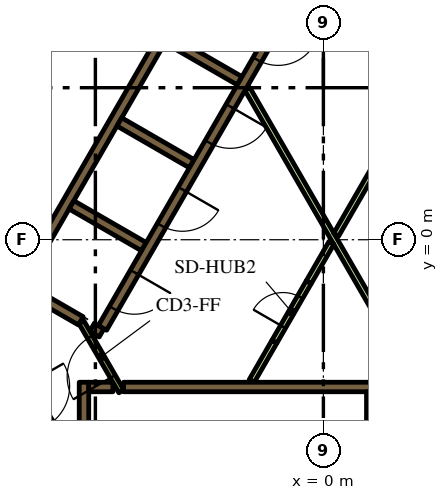
"""IFC4 building model, lengths in metres.
Left out: names, types, materials, properties, quantities, classifications, styles, units other than length and angle.
Written with IfcOpenShell. Run it as: python <this file> out.ifc"""

import sys

from ifc_helpers import new_model, si_unit, direction, frame, frame_2d, origin, place, context, subcontext, project, spatial, rectangle, extrude, element, fill, save


model = new_model("IFC4")
c1 = context("Model", 3, precision=1e-05, world=origin(), true_north=direction((0.0, 1.0)))
c2 = subcontext(c1, "Body", "Model", "MODEL_VIEW")
j1 = project(units=[si_unit("LENGTHUNIT", "METRE"), si_unit("PLANEANGLEUNIT", "RADIAN")], contexts=[c1])
p1 = place(None, origin())
s1 = spatial("IfcSite", under=j1, at=p1, CompositionType="ELEMENT")
p2 = place(p1, origin())
s2 = spatial("IfcBuilding", under=s1, at=p2, CompositionType="ELEMENT")
p3 = place(p2, frame((0.0, 0.0, 122.7)))
s3 = spatial("IfcBuildingStorey", under=s2, at=p3, CompositionType="ELEMENT", Elevation=122.7)
p4 = place(p3, frame((-15.36, -1.503, 0.0), z_axis=(0.0, 0.0, 1.0), x_axis=(0.50000389221, 0.866023156604, 0.0)))
e1 = element("IfcWall", 1, at=p4, inside=s3, PredefinedType="SOLIDWALL", context=c2, shape_type="SweptSolid", body=[
    extrude(rectangle(XDim=21.0, YDim=0.9, at=frame_2d((10.5, 0.0))), origin(), (0.0, 0.0, 1.0), 3.9),
])
p5 = place(p3, frame((-5.259, -3.875, 0.0), z_axis=(0.0, 0.0, 1.0), x_axis=(1.0, 0.0, 0.0)))
e2 = element("IfcWall", 2, at=p5, inside=s3, PredefinedType="SOLIDWALL", context=c2, shape_type="SweptSolid", body=[
    extrude(rectangle(XDim=10.489, YDim=0.25, at=frame_2d((5.244, 0.0))), origin(), (0.0, 0.0, 1.0), 3.9),
])
p6 = place(p3, frame((1.26, -4.0, 0.0), z_axis=(0.0, 0.0, 1.0), x_axis=(0.0, -1.0, 0.0)))
e3 = element("IfcWall", 3, at=p6, inside=s3, PredefinedType="SOLIDWALL", context=c2, shape_type="SweptSolid", body=[
    extrude(rectangle(XDim=2.2, YDim=0.25, at=frame_2d((1.1, 0.0))), origin(), (0.0, 0.0, 1.0), 3.9),
])
p7 = place(p3, frame((-6.3, -3.75, 0.0), z_axis=(0.0, 0.0, 1.0), x_axis=(0.0, -1.0, 0.0)))
e4 = element("IfcWall", 4, at=p7, inside=s3, PredefinedType="SOLIDWALL", context=c2, shape_type="SweptSolid", body=[
    extrude(rectangle(XDim=3.404, YDim=0.25, at=frame_2d((1.702, 0.0))), origin(), (0.0, 0.0, 1.0), 3.9),
])
p8 = place(p3, frame((-6.175, -3.875, 0.0), z_axis=(0.0, 0.0, 1.0), x_axis=(1.0, 0.0, 0.0)))
e5 = element("IfcWall", 5, at=p8, inside=s3, PredefinedType="SOLIDWALL", context=c2, shape_type="SweptSolid", body=[
    extrude(rectangle(XDim=0.637, YDim=0.25, at=frame_2d((0.318, 0.0))), origin(), (0.0, 0.0, 1.0), 3.9),
])
p9 = place(p3, frame((5.97, -2.591, 0.0), z_axis=(0.0, 0.0, 1.0), x_axis=(-0.499994469932, 0.866028596547, 0.0)))
e6 = element("IfcWall", 6, at=p9, inside=s3, PredefinedType="SOLIDWALL", context=c2, shape_type="SweptSolid", body=[
    extrude(rectangle(XDim=10.488, YDim=0.25, at=frame_2d((5.244, 0.0))), origin(), (0.0, 0.0, 1.0), 3.9),
])
p10 = place(p3, frame((-8.06, -1.311, 0.0), z_axis=(0.0, 0.0, 1.0), x_axis=(0.50000273126, 0.866023826885, 0.0)))
e7 = element("IfcWall", 7, at=p10, inside=s3, PredefinedType="SOLIDWALL", context=c2, shape_type="SweptSolid", body=[
    extrude(rectangle(XDim=10.33, YDim=0.25, at=frame_2d((5.165, 0.0))), origin(), (0.0, 0.0, 1.0), 3.9),
])
for number, where, z_axis, x_axis in (
    (8, (-2.204, 4.182, 0.0), (0.0, 0.0, 1.0), (-0.866, 0.5, 0.0)),
    (9, (-5.369, 3.1, 0.0), (0.0, 0.0, 1.0), (0.866, -0.5, 0.0)),
    (10, (-4.724, -0.182, 0.0), (0.0, 0.0, 1.0), (-0.866, 0.5, 0.0)),
):
    element("IfcWall", number, at=place(p3, frame(where, z_axis=z_axis, x_axis=x_axis)), inside=s3, PredefinedType="SOLIDWALL", context=c2, shape_type="SweptSolid", body=[
        extrude(rectangle(XDim=2.2, YDim=0.25, at=frame_2d((1.1, 0.0))), origin(), (0.0, 0.0, 1.0), 3.9),
    ])
p11 = place(p3, frame((-6.088, -2.305, 0.0), z_axis=(0.0, 0.0, 1.0), x_axis=(0.866059450854, -0.499941024108, 0.0)))
e11 = element("IfcWall", 11, at=p11, inside=s3, PredefinedType="SOLIDWALL", context=c2, shape_type="SweptSolid", body=[
    extrude(rectangle(XDim=0.29, YDim=0.25, at=frame_2d((0.145, 0.0))), origin(), (0.0, 0.0, 1.0), 3.9),
])
p12 = place(p3, frame((-7.889, -1.265, 0.0), z_axis=(0.0, 0.0, 1.0), x_axis=(0.865986741702, -0.500066958712, 0.0)))
e12 = element("IfcWall", 12, at=p12, inside=s3, PredefinedType="SOLIDWALL", context=c2, shape_type="SweptSolid", body=[
    extrude(rectangle(XDim=1.738, YDim=0.25, at=frame_2d((0.869, 0.0))), origin(), (0.0, 0.0, 1.0), 3.9),
])
p13 = place(p3, frame((-1.887, -3.718, 0.0), z_axis=(0.0, 0.0, 1.0), x_axis=(0.500057179532, 0.865992388649, 0.0)))
e13 = element("IfcWall", 13, at=p13, inside=s3, PredefinedType="PARTITIONING", context=c2, shape_type="SweptSolid", body=[
    extrude(rectangle(XDim=1.199, YDim=0.15, at=frame_2d((0.6, 0.0))), origin(), (0.0, 0.0, 1.0), 2.75),
])
p14 = place(p3, frame((2.435, -3.718, 0.0), z_axis=(0.0, 0.0, 1.0), x_axis=(-0.499985176046, 0.866033962229, 0.0)))
e14 = element("IfcWall", 14, at=p14, inside=s3, PredefinedType="PARTITIONING", context=c2, shape_type="SweptSolid", body=[
    extrude(rectangle(XDim=8.875, YDim=0.15, at=frame_2d((4.438, 0.0))), origin(), (0.0, 0.0, 1.0), 2.75),
])
p15 = place(p3, frame((0.336, 0.132, 0.0), z_axis=(0.0, 0.0, 1.0), x_axis=(0.500001957507, 0.866024273614, 0.0)))
e15 = element("IfcWall", 15, at=p15, inside=s3, PredefinedType="PARTITIONING", context=c2, shape_type="SweptSolid", body=[
    extrude(rectangle(XDim=3.881, YDim=0.15, at=frame_2d((1.941, 0.0))), origin(), (0.0, 0.0, 1.0), 2.75),
])
p16 = place(p3, frame((-0.387, -1.121, 0.0), z_axis=(0.0, 0.0, 1.0), x_axis=(0.500057179532, 0.865992388649, 0.0)))
e16 = element("IfcWall", 16, at=p16, inside=s3, PredefinedType="PARTITIONING", context=c2, shape_type="SweptSolid", body=[
    extrude(rectangle(XDim=1.199, YDim=0.15, at=frame_2d((0.6, 0.0))), origin(), (0.0, 0.0, 1.0), 2.75),
])
p17 = place(p3, frame((-6.008, 9.144, 0.0), z_axis=(0.0, 0.0, 1.0), x_axis=(-0.500006956611, -0.866021387346, 0.0)))
e17 = element("IfcWall", 17, at=p17, inside=s3, PredefinedType="SOLIDWALL", context=c2, shape_type="SweptSolid", body=[
    extrude(rectangle(XDim=9.83, YDim=0.25, at=frame_2d((4.915, 0.0))), origin(), (0.0, 0.0, 1.0), 3.9),
])
p18 = place(p17, frame((6.985, 0.0, 0.0)))
e18 = element("IfcOpeningElement", 18, at=p18, cuts=e17, PredefinedType="OPENING", context=c2, shape_type="SweptSolid", body=[
    extrude(rectangle(XDim=0.9, YDim=2.1, at=frame_2d((0.45, 1.05))), frame((0.0, 0.135, 0.0), z_axis=(0.0, -1.0, 0.0), x_axis=(1.0, 0.0, 0.0)), (0.0, 0.0, 1.0), 0.27),
])
p19 = place(p3, frame((-0.898, 6.194, 0.0), z_axis=(0.0, 0.0, 1.0), x_axis=(-0.499996202215, -0.866027596426, 0.0)))
e19 = element("IfcWall", 19, at=p19, inside=s3, PredefinedType="SOLIDWALL", context=c2, shape_type="SweptSolid", body=[
    extrude(rectangle(XDim=9.83, YDim=0.25, at=frame_2d((4.915, 0.0))), origin(), (0.0, 0.0, 1.0), 3.9),
])
p20 = place(p19, frame((0.585, 0.0, 0.0)))
e20 = element("IfcOpeningElement", 20, at=p20, cuts=e19, PredefinedType="OPENING", context=c2, shape_type="SweptSolid", body=[
    extrude(rectangle(XDim=1.1, YDim=2.1, at=frame_2d((0.55, 1.05))), frame((0.0, 0.135, 0.0), z_axis=(0.0, -1.0, 0.0), x_axis=(1.0, 0.0, 0.0)), (0.0, 0.0, 1.0), 0.27),
])
p21 = place(p19, frame((3.105, 0.0, 0.0)))
e21 = element("IfcOpeningElement", 21, at=p21, cuts=e19, PredefinedType="OPENING", context=c2, shape_type="SweptSolid", body=[
    extrude(rectangle(XDim=1.1, YDim=2.1, at=frame_2d((0.55, 1.05))), frame((0.0, 0.135, 0.0), z_axis=(0.0, -1.0, 0.0), x_axis=(1.0, 0.0, 0.0)), (0.0, 0.0, 1.0), 0.27),
])
p22 = place(p19, frame((5.625, 0.0, 0.0)))
e22 = element("IfcOpeningElement", 22, at=p22, cuts=e19, PredefinedType="OPENING", context=c2, shape_type="SweptSolid", body=[
    extrude(rectangle(XDim=1.1, YDim=2.1, at=frame_2d((0.55, 1.05))), frame((0.0, 0.135, 0.0), z_axis=(0.0, -1.0, 0.0), x_axis=(1.0, 0.0, 0.0)), (0.0, 0.0, 1.0), 0.27),
])
p23 = place(p19, frame((8.145, 0.0, 0.0)))
e23 = element("IfcOpeningElement", 23, at=p23, cuts=e19, PredefinedType="OPENING", context=c2, shape_type="SweptSolid", body=[
    extrude(rectangle(XDim=1.1, YDim=2.1, at=frame_2d((0.55, 1.05))), frame((0.0, 0.135, 0.0), z_axis=(0.0, -1.0, 0.0), x_axis=(1.0, 0.0, 0.0)), (0.0, 0.0, 1.0), 0.27),
])
p24 = place(p3, frame((-8.103, -3.466, 0.0), z_axis=(0.0, 0.0, 1.0), x_axis=(0.500078061341, -0.865980330357, 0.0)))
e24 = element("IfcWall", 24, at=p24, inside=s3, PredefinedType="SOLIDWALL", context=c2, shape_type="SweptSolid", body=[
    extrude(rectangle(XDim=2.1, YDim=0.4, at=frame_2d((1.05, 0.0))), origin(), (0.0, 0.0, 1.0), 3.9),
])
p25 = place(p24, frame((0.45, 0.0, 0.0)))
e25 = element("IfcOpeningElement", 25, at=p25, cuts=e24, PredefinedType="OPENING", context=c2, shape_type="SweptSolid", body=[
    extrude(rectangle(XDim=1.2, YDim=2.1, at=frame_2d((0.6, 1.05))), frame((0.0, 0.21, 0.0), z_axis=(0.0, -1.0, 0.0), x_axis=(1.0, 0.0, 0.0)), (0.0, 0.0, 1.0), 0.42),
])
p26 = place(p3, frame((-5.317, -3.99, 0.0), z_axis=(0.0, 0.0, 1.0), x_axis=(-0.500027713859, 0.866009402589, 0.0)))
e26 = element("IfcWall", 26, at=p26, inside=s3, PredefinedType="PARTITIONING", context=c2, shape_type="SweptSolid", body=[
    extrude(rectangle(XDim=2.1, YDim=0.15, at=frame_2d((1.05, 0.0))), origin(), (0.0, 0.0, 1.0), 3.9),
])
p27 = place(p26, frame((0.45, 0.0, 0.0)))
e27 = element("IfcOpeningElement", 27, at=p27, cuts=e26, PredefinedType="OPENING", context=c2, shape_type="SweptSolid", body=[
    extrude(rectangle(XDim=1.2, YDim=2.1, at=frame_2d((0.6, 1.05))), frame((0.0, 0.085, 0.0), z_axis=(0.0, -1.0, 0.0), x_axis=(1.0, 0.0, 0.0)), (0.0, 0.0, 1.0), 0.17),
])
p28 = place(p3, frame((-1.287, -2.679, 0.0), z_axis=(0.0, 0.0, 1.0), x_axis=(0.499961193289, 0.866047807691, 0.0)))
e28 = element("IfcWall", 28, at=p28, inside=s3, PredefinedType="PARTITIONING", context=c2, shape_type="SweptSolid", body=[
    extrude(rectangle(XDim=1.8, YDim=0.15, at=frame_2d((0.9, 0.0))), origin(), (0.0, 0.0, 1.0), 2.75),
])
p29 = place(p28, frame((0.45, 0.0, 0.0)))
e29 = element("IfcOpeningElement", 29, at=p29, cuts=e28, PredefinedType="OPENING", context=c2, shape_type="SweptSolid", body=[
    extrude(rectangle(XDim=0.9, YDim=2.1, at=frame_2d((0.45, 1.05))), frame((0.0, 0.085, 0.0), z_axis=(0.0, -1.0, 0.0), x_axis=(1.0, 0.0, 0.0)), (0.0, 0.0, 1.0), 0.17),
])
p30 = place(p3, frame((-19.081, -3.9, 0.0), z_axis=(0.0, 0.0, 1.0), x_axis=(0.499998313975, 0.866026377209, 0.0)))
e30 = element("IfcWall", 30, at=p30, inside=s3, PredefinedType="PARTITIONING", context=c2, shape_type="SweptSolid", body=[
    extrude(rectangle(XDim=25.766, YDim=0.15, at=frame_2d((12.883, 0.0))), origin(), (0.0, 0.0, 1.0), 2.75),
])
p31 = place(p30, frame((19.306, 0.0, 0.0)))
e31 = element("IfcOpeningElement", 31, at=p31, cuts=e30, PredefinedType="OPENING", context=c2, shape_type="SweptSolid", body=[
    extrude(rectangle(XDim=1.0, YDim=2.1, at=frame_2d((0.5, 1.05))), frame((0.0, 0.085, 0.0), z_axis=(0.0, -1.0, 0.0), x_axis=(1.0, 0.0, 0.0)), (0.0, 0.0, 1.0), 0.17),
])
p32 = place(p30, frame((18.0, 0.0, 0.0)))
e32 = element("IfcOpeningElement", 32, at=p32, cuts=e30, PredefinedType="OPENING", context=c2, shape_type="SweptSolid", body=[
    extrude(rectangle(XDim=1.0, YDim=2.1, at=frame_2d((0.5, 1.05))), frame((0.0, 0.085, 0.0), z_axis=(0.0, -1.0, 0.0), x_axis=(1.0, 0.0, 0.0)), (0.0, 0.0, 1.0), 0.17),
])
p33 = place(p30, frame((7.793, 0.0, 0.0)))
e33 = element("IfcOpeningElement", 33, at=p33, cuts=e30, PredefinedType="OPENING", context=c2, shape_type="SweptSolid", body=[
    extrude(rectangle(XDim=0.9, YDim=2.1, at=frame_2d((0.45, 1.05))), frame((0.0, 0.085, 0.0), z_axis=(0.0, -1.0, 0.0), x_axis=(1.0, 0.0, 0.0)), (0.0, 0.0, 1.0), 0.17),
])
p34 = place(p30, frame((4.674, 0.0, 0.0)))
e34 = element("IfcOpeningElement", 34, at=p34, cuts=e30, PredefinedType="OPENING", context=c2, shape_type="SweptSolid", body=[
    extrude(rectangle(XDim=0.9, YDim=2.1, at=frame_2d((0.45, 1.05))), frame((0.0, 0.085, 0.0), z_axis=(0.0, -1.0, 0.0), x_axis=(1.0, 0.0, 0.0)), (0.0, 0.0, 1.0), 0.17),
])
p35 = place(p30, frame((0.18, 0.0, 0.0)))
e35 = element("IfcOpeningElement", 35, at=p35, cuts=e30, PredefinedType="OPENING", context=c2, shape_type="SweptSolid", body=[
    extrude(rectangle(XDim=1.0, YDim=2.1, at=frame_2d((0.5, 1.05))), frame((0.0, 0.085, 0.0), z_axis=(0.0, -1.0, 0.0), x_axis=(1.0, 0.0, 0.0)), (0.0, 0.0, 1.0), 0.17),
])
p36 = place(p20, origin())
e36 = element("IfcDoor", 36, at=p36, inside=s3, OperationType="DOUBLE_DOOR_SLIDING", PredefinedType="DOOR", context=c2, shape_type="SweptSolid", body=[
    extrude(rectangle(XDim=1.1, YDim=2.1, at=frame_2d((0.55, 1.05))), frame((0.0, 0.025, 0.0), z_axis=(0.0, -1.0, 0.0), x_axis=(1.0, 0.0, 0.0)), (0.0, 0.0, 1.0), 0.05),
])
fill(e20, e36)
p37 = place(p21, origin())
e37 = element("IfcDoor", 37, at=p37, inside=s3, OperationType="DOUBLE_DOOR_SLIDING", PredefinedType="DOOR", context=c2, shape_type="SweptSolid", body=[
    extrude(rectangle(XDim=1.1, YDim=2.1, at=frame_2d((0.55, 1.05))), frame((0.0, 0.025, 0.0), z_axis=(0.0, -1.0, 0.0), x_axis=(1.0, 0.0, 0.0)), (0.0, 0.0, 1.0), 0.05),
])
fill(e21, e37)
p38 = place(p22, origin())
e38 = element("IfcDoor", 38, at=p38, inside=s3, OperationType="DOUBLE_DOOR_SLIDING", PredefinedType="DOOR", context=c2, shape_type="SweptSolid", body=[
    extrude(rectangle(XDim=1.1, YDim=2.1, at=frame_2d((0.55, 1.05))), frame((0.0, 0.025, 0.0), z_axis=(0.0, -1.0, 0.0), x_axis=(1.0, 0.0, 0.0)), (0.0, 0.0, 1.0), 0.05),
])
fill(e22, e38)
p39 = place(p23, origin())
e39 = element("IfcDoor", 39, at=p39, inside=s3, OperationType="DOUBLE_DOOR_SLIDING", PredefinedType="DOOR", context=c2, shape_type="SweptSolid", body=[
    extrude(rectangle(XDim=1.1, YDim=2.1, at=frame_2d((0.55, 1.05))), frame((0.0, 0.025, 0.0), z_axis=(0.0, -1.0, 0.0), x_axis=(1.0, 0.0, 0.0)), (0.0, 0.0, 1.0), 0.05),
])
fill(e23, e39)
p40 = place(p27, origin())
e40 = element("IfcDoor", 40, at=p40, inside=s3, OperationType="SINGLE_SWING_LEFT", PredefinedType="DOOR", context=c2, shape_type="SweptSolid", body=[
    extrude(rectangle(XDim=1.2, YDim=2.1, at=frame_2d((0.6, 1.05))), frame((0.0, 0.025, 0.0), z_axis=(0.0, -1.0, 0.0), x_axis=(1.0, 0.0, 0.0)), (0.0, 0.0, 1.0), 0.05),
])
fill(e27, e40)
p41 = place(p29, origin())
e41 = element("IfcDoor", 41, at=p41, inside=s3, OperationType="SINGLE_SWING_LEFT", PredefinedType="DOOR", context=c2, shape_type="SweptSolid", body=[
    extrude(rectangle(XDim=0.9, YDim=2.1, at=frame_2d((0.45, 1.05))), frame((0.0, 0.025, 0.0), z_axis=(0.0, -1.0, 0.0), x_axis=(1.0, 0.0, 0.0)), (0.0, 0.0, 1.0), 0.05),
])
fill(e29, e41)
save(model, sys.argv[1])
